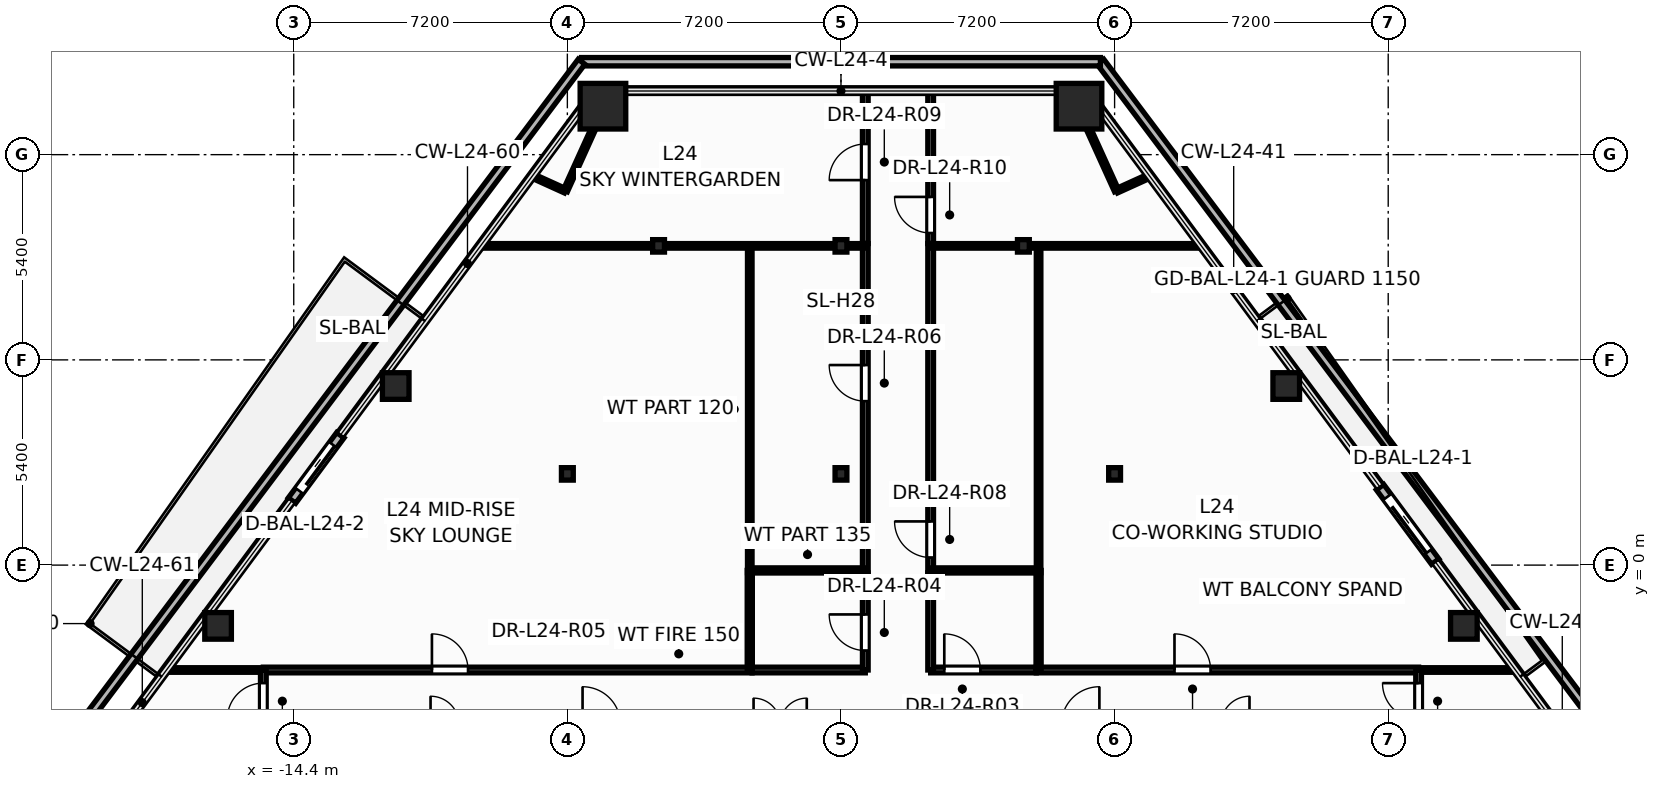
"""IFC4 building model, lengths in metres.
Left out: names, types, materials, properties, quantities, classifications, styles, units other than length and angle.
Written with IfcOpenShell. Run it as: python <this file> out.ifc"""

import sys

from ifc_helpers import new_model, si_unit, direction, frame, frame_2d, origin, origin_2d, place, context, subcontext, project, spatial, rectangle, hollow_rectangle, hollow_circle, i_section, extrude, element, fill, save


model = new_model("IFC4")
c1 = context("Model", 3, precision=1e-05, world=origin(), true_north=direction((0.0, 1.0)))
c2 = subcontext(c1, "Body", "Model", "MODEL_VIEW")
j1 = project(units=[si_unit("LENGTHUNIT", "METRE"), si_unit("PLANEANGLEUNIT", "RADIAN")], contexts=[c1])
p1 = place(None, origin())
s1 = spatial("IfcSite", under=j1, at=p1, CompositionType="ELEMENT")
p2 = place(p1, origin())
s2 = spatial("IfcBuilding", under=s1, at=p2, CompositionType="ELEMENT")
p3 = place(p2, frame((0.0, 0.0, 94.8)))
s3 = spatial("IfcBuildingStorey", under=s2, at=p3, CompositionType="ELEMENT", Elevation=94.8)
for number, where, z_axis, x_axis in (
    (1, (6.264, 12.075, 0.0), (0.0, 0.0, 1.0), (1.0, 0.0, 0.0)),
    (2, (-6.264, 12.075, 0.0), (0.0, 0.0, 1.0), (1.0, 0.0, 0.0)),
):
    element("IfcColumn", number, at=place(p3, frame(where, z_axis=z_axis, x_axis=x_axis)), inside=s3, PredefinedType="COLUMN", context=c2, shape_type="SweptSolid", body=[
        extrude(hollow_rectangle(XDim=1.2, YDim=1.2, WallThickness=0.055, at=origin_2d()), origin(), (0.0, 0.0, 1.0), 4.8),
    ])
for number, where, z_axis, x_axis in (
    (3, (16.391, -1.599, 0.0), (0.0, 0.0, 1.0), (1.0, 0.0, 0.0)),
    (4, (11.717, 4.712, 0.0), (0.0, 0.0, 1.0), (1.0, 0.0, 0.0)),
    (5, (-11.717, 4.712, 0.0), (0.0, 0.0, 1.0), (1.0, 0.0, 0.0)),
    (6, (-16.391, -1.599, 0.0), (0.0, 0.0, 1.0), (1.0, 0.0, 0.0)),
):
    element("IfcColumn", number, at=place(p3, frame(where, z_axis=z_axis, x_axis=x_axis)), inside=s3, PredefinedType="COLUMN", context=c2, shape_type="SweptSolid", body=[
        extrude(hollow_circle(Radius=0.35, WallThickness=0.03, at=origin_2d()), origin(), (0.0, 0.0, 1.0), 4.8),
    ])
for number, where, z_axis, x_axis in (
    (7, (-7.2, 2.4, 0.0), (0.0, 0.0, 1.0), (1.0, 0.0, 0.0)),
    (8, (0.0, 2.4, 0.0), (0.0, 0.0, 1.0), (1.0, 0.0, 0.0)),
    (9, (7.2, 2.4, 0.0), (0.0, 0.0, 1.0), (1.0, 0.0, 0.0)),
    (10, (-4.8, 8.4, 0.0), (0.0, 0.0, 1.0), (1.0, 0.0, 0.0)),
    (11, (0.0, 8.4, 0.0), (0.0, 0.0, 1.0), (1.0, 0.0, 0.0)),
    (12, (4.8, 8.4, 0.0), (0.0, 0.0, 1.0), (1.0, 0.0, 0.0)),
):
    element("IfcColumn", number, at=place(p3, frame(where, z_axis=z_axis, x_axis=x_axis)), inside=s3, PredefinedType="COLUMN", context=c2, shape_type="SweptSolid", body=[
        extrude(i_section(OverallWidth=0.311, OverallDepth=0.327, WebThickness=0.016, FlangeThickness=0.025, at=origin_2d()), origin(), (0.0, 0.0, 1.0), 4.8),
    ])
p4 = place(p3, frame((23.595, -9.052, -0.02), z_axis=(0.0, 0.0, 1.0), x_axis=(-0.601046808783, 0.799213822235, 0.0)))
e13 = element("IfcWall", 13, at=p4, inside=s3, PredefinedType="PARAPET", context=c2, shape_type="SweptSolid", body=[
    extrude(rectangle(XDim=27.898, YDim=0.22, at=frame_2d((13.949, 0.0))), origin(), (0.0, 0.0, 1.0), 1.17),
])
p5 = place(p3, frame((6.827, 13.245, -0.02), z_axis=(0.0, 0.0, 1.0), x_axis=(-1.0, 0.0, 0.0)))
e14 = element("IfcWall", 14, at=p5, inside=s3, PredefinedType="PARAPET", context=c2, shape_type="SweptSolid", body=[
    extrude(rectangle(XDim=13.653, YDim=0.22, at=frame_2d((6.827, 0.0))), origin(), (0.0, 0.0, 1.0), 1.17),
])
p6 = place(p3, frame((-6.827, 13.245, -0.02), z_axis=(0.0, 0.0, 1.0), x_axis=(-0.601046808783, -0.799213822235, 0.0)))
e15 = element("IfcWall", 15, at=p6, inside=s3, PredefinedType="PARAPET", context=c2, shape_type="SweptSolid", body=[
    extrude(rectangle(XDim=27.898, YDim=0.22, at=frame_2d((13.949, 0.0))), origin(), (0.0, 0.0, 1.0), 1.17),
])
p7 = place(p3, frame((15.637, 0.091, -0.015), z_axis=(0.0, 0.0, 1.0), x_axis=(-0.595170117465, 0.803599733248, 0.0)))
e16 = element("IfcWall", 16, at=p7, inside=s3, PredefinedType="STANDARD", context=c2, shape_type="SweptSolid", body=[
    extrude(rectangle(XDim=2.44, YDim=0.24, at=frame_2d((1.22, 0.0))), origin(), (0.0, 0.0, 1.0), 3.928),
])
p8 = place(p7, frame((0.32, 0.0, 0.015)))
e17 = element("IfcOpeningElement", 17, at=p8, cuts=e16, PredefinedType="OPENING", context=c2, shape_type="SweptSolid", body=[
    extrude(rectangle(XDim=1.806, YDim=2.204, at=frame_2d((0.9, 1.102))), frame((0.0, 0.13, 0.0), z_axis=(0.0, -1.0, 0.0), x_axis=(1.0, 0.0, 0.0)), (0.0, 0.0, 1.0), 0.26),
])
p9 = place(p3, frame((-13.173, 3.418, -0.015), z_axis=(0.0, 0.0, 1.0), x_axis=(-0.595170255066, -0.803599631337, 0.0)))
e18 = element("IfcWall", 18, at=p9, inside=s3, PredefinedType="STANDARD", context=c2, shape_type="SweptSolid", body=[
    extrude(rectangle(XDim=2.14, YDim=0.24, at=frame_2d((1.07, 0.0))), origin(), (0.0, 0.0, 1.0), 3.928),
])
p10 = place(p9, frame((0.32, 0.0, 0.015)))
e19 = element("IfcOpeningElement", 19, at=p10, cuts=e18, PredefinedType="OPENING", context=c2, shape_type="SweptSolid", body=[
    extrude(rectangle(XDim=1.506, YDim=2.204, at=frame_2d((0.75, 1.102))), frame((0.0, 0.13, 0.0), z_axis=(0.0, -1.0, 0.0), x_axis=(1.0, 0.0, 0.0)), (0.0, 0.0, 1.0), 0.26),
])
p11 = place(p3, frame((-15.2, -2.76, 0.0), z_axis=(0.0, 0.0, 1.0), x_axis=(1.0, 0.0, 0.0)))
e20 = element("IfcWall", 20, at=p11, inside=s3, PredefinedType="PARTITIONING", context=c2, shape_type="SweptSolid", body=[
    extrude(rectangle(XDim=12.86, YDim=0.15, at=frame_2d((6.43, 0.0))), origin(), (0.0, 0.0, 1.0), 3.525),
])
p12 = place(p11, frame((4.436, 0.0, 0.0)))
e21 = element("IfcOpeningElement", 21, at=p12, cuts=e20, PredefinedType="OPENING", context=c2, shape_type="SweptSolid", body=[
    extrude(rectangle(XDim=0.956, YDim=2.104, at=frame_2d((0.475, 1.052))), frame((0.0, 0.085, 0.0), z_axis=(0.0, -1.0, 0.0), x_axis=(1.0, 0.0, 0.0)), (0.0, 0.0, 1.0), 0.17),
])
p13 = place(p3, frame((5.14, -2.76, 0.0), z_axis=(0.0, 0.0, 1.0), x_axis=(1.0, 0.0, 0.0)))
e22 = element("IfcWall", 22, at=p13, inside=s3, PredefinedType="PARTITIONING", context=c2, shape_type="SweptSolid", body=[
    extrude(rectangle(XDim=10.06, YDim=0.15, at=frame_2d((5.03, 0.0))), origin(), (0.0, 0.0, 1.0), 3.525),
])
p14 = place(p13, frame((3.636, 0.0, 0.0)))
e23 = element("IfcOpeningElement", 23, at=p14, cuts=e22, PredefinedType="OPENING", context=c2, shape_type="SweptSolid", body=[
    extrude(rectangle(XDim=0.956, YDim=2.104, at=frame_2d((0.475, 1.052))), frame((0.0, 0.085, 0.0), z_axis=(0.0, -1.0, 0.0), x_axis=(1.0, 0.0, 0.0)), (0.0, 0.0, 1.0), 0.17),
])
p15 = place(p3, frame((0.64, -0.2, 0.0), z_axis=(0.0, 0.0, 1.0), x_axis=(0.0, 1.0, 0.0)))
e24 = element("IfcWall", 24, at=p15, inside=s3, PredefinedType="PARTITIONING", context=c2, shape_type="SweptSolid", body=[
    extrude(rectangle(XDim=8.66, YDim=0.15, at=frame_2d((4.33, 0.0))), origin(), (0.0, 0.0, 1.0), 3.525),
])
p16 = place(p15, frame((4.514, 0.0, 0.0)))
e25 = element("IfcOpeningElement", 25, at=p16, cuts=e24, PredefinedType="OPENING", context=c2, shape_type="SweptSolid", body=[
    extrude(rectangle(XDim=0.956, YDim=2.104, at=frame_2d((0.475, 1.052))), frame((0.0, 0.085, 0.0), z_axis=(0.0, -1.0, 0.0), x_axis=(1.0, 0.0, 0.0)), (0.0, 0.0, 1.0), 0.17),
])
p17 = place(p3, frame((2.36, -0.2, 0.0), z_axis=(0.0, 0.0, 1.0), x_axis=(0.0, 1.0, 0.0)))
e26 = element("IfcWall", 26, at=p17, inside=s3, PredefinedType="PARTITIONING", context=c2, shape_type="SweptSolid", body=[
    extrude(rectangle(XDim=8.66, YDim=0.15, at=frame_2d((4.33, 0.0))), origin(), (0.0, 0.0, 1.0), 3.525),
])
p18 = place(p17, frame((0.4, 0.0, 0.0)))
e27 = element("IfcOpeningElement", 27, at=p18, cuts=e26, PredefinedType="OPENING", context=c2, shape_type="SweptSolid", body=[
    extrude(rectangle(XDim=0.956, YDim=2.104, at=frame_2d((0.475, 1.052))), frame((0.0, 0.085, 0.0), z_axis=(0.0, -1.0, 0.0), x_axis=(1.0, 0.0, 0.0)), (0.0, 0.0, 1.0), 0.17),
])
for number, where, z_axis, x_axis in (
    (28, (-2.4, -0.2, 0.0), (0.0, 0.0, 1.0), (0.0, 1.0, 0.0)),
    (29, (5.2, -0.2, 0.0), (0.0, 0.0, 1.0), (0.0, 1.0, 0.0)),
):
    element("IfcWall", number, at=place(p3, frame(where, z_axis=z_axis, x_axis=x_axis)), inside=s3, PredefinedType="PARTITIONING", context=c2, shape_type="SweptSolid", body=[
        extrude(rectangle(XDim=8.6, YDim=0.12, at=frame_2d((4.3, 0.0))), origin(), (0.0, 0.0, 1.0), 3.525),
    ])
p19 = place(p3, frame((-9.483, 8.4, 0.0), z_axis=(0.0, 0.0, 1.0), x_axis=(1.0, 0.0, 0.0)))
e30 = element("IfcWall", 30, at=p19, inside=s3, PredefinedType="PARTITIONING", context=c2, shape_type="SweptSolid", body=[
    extrude(rectangle(XDim=10.123, YDim=0.12, at=frame_2d((5.062, 0.0))), origin(), (0.0, 0.0, 1.0), 3.525),
])
p20 = place(p3, frame((2.36, 8.4, 0.0), z_axis=(0.0, 0.0, 1.0), x_axis=(1.0, 0.0, 0.0)))
e31 = element("IfcWall", 31, at=p20, inside=s3, PredefinedType="PARTITIONING", context=c2, shape_type="SweptSolid", body=[
    extrude(rectangle(XDim=7.123, YDim=0.12, at=frame_2d((3.562, 0.0))), origin(), (0.0, 0.0, 1.0), 3.525),
])
p21 = place(p3, frame((0.64, 8.462, 0.0), z_axis=(0.0, 0.0, 1.0), x_axis=(0.0, 1.0, 0.0)))
e32 = element("IfcWall", 32, at=p21, inside=s3, PredefinedType="PARTITIONING", context=c2, shape_type="SweptSolid", body=[
    extrude(rectangle(XDim=4.013, YDim=0.15, at=frame_2d((2.006, 0.0))), origin(), (0.0, 0.0, 1.0), 3.525),
])
p22 = place(p21, frame((1.668, 0.0, 0.0)))
e33 = element("IfcOpeningElement", 33, at=p22, cuts=e32, PredefinedType="OPENING", context=c2, shape_type="SweptSolid", body=[
    extrude(rectangle(XDim=0.956, YDim=2.104, at=frame_2d((0.475, 1.052))), frame((0.0, 0.085, 0.0), z_axis=(0.0, -1.0, 0.0), x_axis=(1.0, 0.0, 0.0)), (0.0, 0.0, 1.0), 0.17),
])
p23 = place(p3, frame((2.36, 8.462, 0.0), z_axis=(0.0, 0.0, 1.0), x_axis=(0.0, 1.0, 0.0)))
e34 = element("IfcWall", 34, at=p23, inside=s3, PredefinedType="PARTITIONING", context=c2, shape_type="SweptSolid", body=[
    extrude(rectangle(XDim=4.013, YDim=0.15, at=frame_2d((2.006, 0.0))), origin(), (0.0, 0.0, 1.0), 3.525),
])
p24 = place(p23, frame((0.276, 0.0, 0.0)))
e35 = element("IfcOpeningElement", 35, at=p24, cuts=e34, PredefinedType="OPENING", context=c2, shape_type="SweptSolid", body=[
    extrude(rectangle(XDim=0.956, YDim=2.104, at=frame_2d((0.475, 1.052))), frame((0.0, 0.085, 0.0), z_axis=(0.0, -1.0, 0.0), x_axis=(1.0, 0.0, 0.0)), (0.0, 0.0, 1.0), 0.17),
])
p25 = place(p3, frame((-2.338, -2.76, 0.0), z_axis=(0.0, 0.0, 1.0), x_axis=(1.0, 0.0, 0.0)))
e36 = element("IfcWall", 36, at=p25, inside=s3, PredefinedType="PARTITIONING", context=c2, shape_type="SweptSolid", body=[
    extrude(rectangle(XDim=2.978, YDim=0.15, at=frame_2d((1.489, 0.0))), origin(), (0.0, 0.0, 1.0), 3.525),
])
p26 = place(p3, frame((-2.4, -0.14, 0.0), z_axis=(0.0, 0.0, 1.0), x_axis=(1.0, 0.0, 0.0)))
e37 = element("IfcWall", 37, at=p26, inside=s3, PredefinedType="PARTITIONING", context=c2, shape_type="SweptSolid", body=[
    extrude(rectangle(XDim=3.04, YDim=0.135, at=frame_2d((1.52, 0.0))), origin(), (0.0, 0.0, 1.0), 3.525),
])
p27 = place(p3, frame((2.36, -2.76, 0.0), z_axis=(0.0, 0.0, 1.0), x_axis=(1.0, 0.0, 0.0)))
e38 = element("IfcWall", 38, at=p27, inside=s3, PredefinedType="PARTITIONING", context=c2, shape_type="SweptSolid", body=[
    extrude(rectangle(XDim=2.778, YDim=0.15, at=frame_2d((1.389, 0.0))), origin(), (0.0, 0.0, 1.0), 4.119),
])
p28 = place(p27, frame((0.359, 0.0, 0.0)))
e39 = element("IfcOpeningElement", 39, at=p28, cuts=e38, PredefinedType="OPENING", context=c2, shape_type="SweptSolid", body=[
    extrude(rectangle(XDim=0.956, YDim=2.104, at=frame_2d((0.475, 1.052))), frame((0.0, 0.085, 0.0), z_axis=(0.0, -1.0, 0.0), x_axis=(1.0, 0.0, 0.0)), (0.0, 0.0, 1.0), 0.17),
])
p29 = place(p3, frame((2.36, -0.14, 0.0), z_axis=(0.0, 0.0, 1.0), x_axis=(1.0, 0.0, 0.0)))
e40 = element("IfcWall", 40, at=p29, inside=s3, PredefinedType="PARTITIONING", context=c2, shape_type="SweptSolid", body=[
    extrude(rectangle(XDim=2.84, YDim=0.135, at=frame_2d((1.42, 0.0))), origin(), (0.0, 0.0, 1.0), 4.119),
])
p30 = place(p3, frame((2.36, -2.76, 0.0), z_axis=(0.0, 0.0, 1.0), x_axis=(0.0, 1.0, 0.0)))
e41 = element("IfcWall", 41, at=p30, inside=s3, PredefinedType="PARTITIONING", context=c2, shape_type="SweptSolid", body=[
    extrude(rectangle(XDim=2.558, YDim=0.15, at=frame_2d((1.279, 0.0))), origin(), (0.0, 0.0, 1.0), 4.55),
])
p31 = place(p3, frame((0.64, -2.76, 0.0), z_axis=(0.0, 0.0, 1.0), x_axis=(0.0, 1.0, 0.0)))
e42 = element("IfcWall", 42, at=p31, inside=s3, PredefinedType="PARTITIONING", context=c2, shape_type="SweptSolid", body=[
    extrude(rectangle(XDim=2.558, YDim=0.15, at=frame_2d((1.279, 0.0))), origin(), (0.0, 0.0, 1.0), 4.55),
])
p32 = place(p31, frame((0.512, 0.0, 0.0)))
e43 = element("IfcOpeningElement", 43, at=p32, cuts=e42, PredefinedType="OPENING", context=c2, shape_type="SweptSolid", body=[
    extrude(rectangle(XDim=0.956, YDim=2.104, at=frame_2d((0.475, 1.052))), frame((0.0, 0.085, 0.0), z_axis=(0.0, -1.0, 0.0), x_axis=(1.0, 0.0, 0.0)), (0.0, 0.0, 1.0), 0.17),
])
for number, where, z_axis, x_axis in (
    (44, (5.2, -2.76, 0.0), (0.0, 0.0, 1.0), (0.0, 1.0, 0.0)),
    (45, (-2.4, -2.76, 0.0), (0.0, 0.0, 1.0), (0.0, 1.0, 0.0)),
):
    element("IfcWall", number, at=place(p3, frame(where, z_axis=z_axis, x_axis=x_axis)), inside=s3, PredefinedType="PARTITIONING", context=c2, shape_type="SweptSolid", body=[
        extrude(rectangle(XDim=2.62, YDim=0.135, at=frame_2d((1.31, 0.0))), origin(), (0.0, 0.0, 1.0), 4.55),
    ])
for number, where, z_axis, x_axis in (
    (46, (-17.749, -2.76, 0.0), (0.0, 0.0, 1.0), (1.0, 0.0, 0.0)),
    (47, (15.2, -2.76, 0.0), (0.0, 0.0, 1.0), (1.0, 0.0, 0.0)),
):
    element("IfcWall", number, at=place(p3, frame(where, z_axis=z_axis, x_axis=x_axis)), inside=s3, PredefinedType="PARTITIONING", context=c2, shape_type="SweptSolid", body=[
        extrude(rectangle(XDim=2.549, YDim=0.12, at=frame_2d((1.274, 0.0))), origin(), (0.0, 0.0, 1.0), 3.913),
    ])
for number, where, z_axis, x_axis in (
    (48, (-6.469, 11.577, 0.0), (0.0, 0.0, 1.0), (-0.413, -0.911, 0.0)),
    (49, (7.254, 9.847, 0.0), (0.0, 0.0, 1.0), (-0.413, 0.911, 0.0)),
):
    element("IfcWall", number, at=place(p3, frame(where, z_axis=z_axis, x_axis=x_axis)), inside=s3, PredefinedType="PARTITIONING", context=c2, shape_type="SweptSolid", body=[
        extrude(rectangle(XDim=1.899, YDim=0.12, at=frame_2d((0.949, 0.0))), origin(), (0.0, 0.0, 1.0), 4.55),
    ])
p33 = place(p3, frame((-15.2, -4.4, 0.0), z_axis=(0.0, 0.0, 1.0), x_axis=(0.0, 1.0, 0.0)))
e50 = element("IfcWall", 50, at=p33, inside=s3, PredefinedType="PARTITIONING", context=c2, shape_type="SweptSolid", body=[
    extrude(rectangle(XDim=1.64, YDim=0.15, at=frame_2d((0.82, 0.0))), origin(), (0.0, 0.0, 1.0), 4.55),
])
p34 = place(p33, frame((0.345, 0.0, 0.0)))
e51 = element("IfcOpeningElement", 51, at=p34, cuts=e50, PredefinedType="OPENING", context=c2, shape_type="SweptSolid", body=[
    extrude(rectangle(XDim=0.956, YDim=2.104, at=frame_2d((0.475, 1.052))), frame((0.0, 0.085, 0.0), z_axis=(0.0, -1.0, 0.0), x_axis=(1.0, 0.0, 0.0)), (0.0, 0.0, 1.0), 0.17),
])
p35 = place(p3, frame((15.2, -4.4, 0.0), z_axis=(0.0, 0.0, 1.0), x_axis=(0.0, 1.0, 0.0)))
e52 = element("IfcWall", 52, at=p35, inside=s3, PredefinedType="PARTITIONING", context=c2, shape_type="SweptSolid", body=[
    extrude(rectangle(XDim=1.64, YDim=0.15, at=frame_2d((0.82, 0.0))), origin(), (0.0, 0.0, 1.0), 4.55),
])
p36 = place(p35, frame((0.345, 0.0, 0.0)))
e53 = element("IfcOpeningElement", 53, at=p36, cuts=e52, PredefinedType="OPENING", context=c2, shape_type="SweptSolid", body=[
    extrude(rectangle(XDim=0.956, YDim=2.104, at=frame_2d((0.475, 1.052))), frame((0.0, 0.085, 0.0), z_axis=(0.0, -1.0, 0.0), x_axis=(1.0, 0.0, 0.0)), (0.0, 0.0, 1.0), 0.17),
])
for number, where, z_axis, x_axis in (
    (54, (-7.254, 9.847, 0.0), (0.0, 0.0, 1.0), (-0.911, 0.413, 0.0)),
    (55, (8.111, 10.236, 0.0), (0.0, 0.0, 1.0), (-0.911, -0.413, 0.0)),
):
    element("IfcWall", number, at=place(p3, frame(where, z_axis=z_axis, x_axis=x_axis)), inside=s3, PredefinedType="PARTITIONING", context=c2, shape_type="SweptSolid", body=[
        extrude(rectangle(XDim=0.941, YDim=0.12, at=frame_2d((0.471, 0.0))), origin(), (0.0, 0.0, 1.0), 3.913),
    ])
for number, where, z_axis, x_axis in (
    (56, (-6.706, 12.133, 0.0), (0.0, 0.0, 1.0), (0.392, -0.92, 0.0)),
    (57, (6.469, 11.577, 0.0), (0.0, 0.0, 1.0), (0.392, 0.92, 0.0)),
):
    element("IfcWall", number, at=place(p3, frame(where, z_axis=z_axis, x_axis=x_axis)), inside=s3, PredefinedType="PARTITIONING", context=c2, shape_type="SweptSolid", body=[
        extrude(rectangle(XDim=0.604, YDim=0.12, at=frame_2d((0.302, 0.0))), origin(), (0.0, 0.0, 1.0), 3.913),
    ])
p37 = place(p8, origin())
e58 = element("IfcDoor", 58, at=p37, inside=s3, OperationType="SLIDING_TO_LEFT", PredefinedType="DOOR", context=c2, shape_type="SweptSolid", body=[
    extrude(rectangle(XDim=1.8, YDim=2.2, at=frame_2d((0.9, 1.1))), frame((0.0, 0.025, 0.0), z_axis=(0.0, -1.0, 0.0), x_axis=(1.0, 0.0, 0.0)), (0.0, 0.0, 1.0), 0.05),
])
fill(e17, e58)
p38 = place(p10, origin())
e59 = element("IfcDoor", 59, at=p38, inside=s3, OperationType="SLIDING_TO_RIGHT", PredefinedType="DOOR", context=c2, shape_type="SweptSolid", body=[
    extrude(rectangle(XDim=1.5, YDim=2.2, at=frame_2d((0.75, 1.1))), frame((0.0, 0.025, 0.0), z_axis=(0.0, -1.0, 0.0), x_axis=(1.0, 0.0, 0.0)), (0.0, 0.0, 1.0), 0.05),
])
fill(e19, e59)
p39 = place(p34, origin())
e60 = element("IfcDoor", 60, at=p39, inside=s3, OperationType="SINGLE_SWING_LEFT", PredefinedType="DOOR", context=c2, shape_type="SweptSolid", body=[
    extrude(rectangle(XDim=0.95, YDim=2.1, at=frame_2d((0.475, 1.05))), frame((0.0, 0.025, 0.0), z_axis=(0.0, -1.0, 0.0), x_axis=(1.0, 0.0, 0.0)), (0.0, 0.0, 1.0), 0.05),
])
fill(e51, e60)
p40 = place(p36, origin())
e61 = element("IfcDoor", 61, at=p40, inside=s3, OperationType="SINGLE_SWING_RIGHT", PredefinedType="DOOR", context=c2, shape_type="SweptSolid", body=[
    extrude(rectangle(XDim=0.95, YDim=2.1, at=frame_2d((0.475, 1.05))), frame((0.0, 0.025, 0.0), z_axis=(0.0, -1.0, 0.0), x_axis=(1.0, 0.0, 0.0)), (0.0, 0.0, 1.0), 0.05),
])
fill(e53, e61)
p41 = place(p28, origin())
e62 = element("IfcDoor", 62, at=p41, inside=s3, OperationType="SINGLE_SWING_LEFT", PredefinedType="DOOR", context=c2, shape_type="SweptSolid", body=[
    extrude(rectangle(XDim=0.95, YDim=2.1, at=frame_2d((0.475, 1.05))), frame((0.0, 0.025, 0.0), z_axis=(0.0, -1.0, 0.0), x_axis=(1.0, 0.0, 0.0)), (0.0, 0.0, 1.0), 0.05),
])
fill(e39, e62)
p42 = place(p32, origin())
e63 = element("IfcDoor", 63, at=p42, inside=s3, OperationType="SINGLE_SWING_RIGHT", PredefinedType="DOOR", context=c2, shape_type="SweptSolid", body=[
    extrude(rectangle(XDim=0.95, YDim=2.1, at=frame_2d((0.475, 1.05))), frame((0.0, 0.025, 0.0), z_axis=(0.0, -1.0, 0.0), x_axis=(1.0, 0.0, 0.0)), (0.0, 0.0, 1.0), 0.05),
])
fill(e43, e63)
p43 = place(p12, origin())
e64 = element("IfcDoor", 64, at=p43, inside=s3, OperationType="SINGLE_SWING_LEFT", PredefinedType="DOOR", context=c2, shape_type="SweptSolid", body=[
    extrude(rectangle(XDim=0.95, YDim=2.1, at=frame_2d((0.475, 1.05))), frame((0.0, 0.025, 0.0), z_axis=(0.0, -1.0, 0.0), x_axis=(1.0, 0.0, 0.0)), (0.0, 0.0, 1.0), 0.05),
])
fill(e21, e64)
p44 = place(p16, origin())
e65 = element("IfcDoor", 65, at=p44, inside=s3, OperationType="SINGLE_SWING_RIGHT", PredefinedType="DOOR", context=c2, shape_type="SweptSolid", body=[
    extrude(rectangle(XDim=0.95, YDim=2.1, at=frame_2d((0.475, 1.05))), frame((0.0, 0.025, 0.0), z_axis=(0.0, -1.0, 0.0), x_axis=(1.0, 0.0, 0.0)), (0.0, 0.0, 1.0), 0.05),
])
fill(e25, e65)
p45 = place(p14, origin())
e66 = element("IfcDoor", 66, at=p45, inside=s3, OperationType="SINGLE_SWING_LEFT", PredefinedType="DOOR", context=c2, shape_type="SweptSolid", body=[
    extrude(rectangle(XDim=0.95, YDim=2.1, at=frame_2d((0.475, 1.05))), frame((0.0, 0.025, 0.0), z_axis=(0.0, -1.0, 0.0), x_axis=(1.0, 0.0, 0.0)), (0.0, 0.0, 1.0), 0.05),
])
fill(e23, e66)
p46 = place(p18, origin())
e67 = element("IfcDoor", 67, at=p46, inside=s3, OperationType="SINGLE_SWING_RIGHT", PredefinedType="DOOR", context=c2, shape_type="SweptSolid", body=[
    extrude(rectangle(XDim=0.95, YDim=2.1, at=frame_2d((0.475, 1.05))), frame((0.0, 0.025, 0.0), z_axis=(0.0, -1.0, 0.0), x_axis=(1.0, 0.0, 0.0)), (0.0, 0.0, 1.0), 0.05),
])
fill(e27, e67)
p47 = place(p22, origin())
e68 = element("IfcDoor", 68, at=p47, inside=s3, OperationType="SINGLE_SWING_LEFT", PredefinedType="DOOR", context=c2, shape_type="SweptSolid", body=[
    extrude(rectangle(XDim=0.95, YDim=2.1, at=frame_2d((0.475, 1.05))), frame((0.0, 0.025, 0.0), z_axis=(0.0, -1.0, 0.0), x_axis=(1.0, 0.0, 0.0)), (0.0, 0.0, 1.0), 0.05),
])
fill(e33, e68)
p48 = place(p24, origin())
e69 = element("IfcDoor", 69, at=p48, inside=s3, OperationType="SINGLE_SWING_RIGHT", PredefinedType="DOOR", context=c2, shape_type="SweptSolid", body=[
    extrude(rectangle(XDim=0.95, YDim=2.1, at=frame_2d((0.475, 1.05))), frame((0.0, 0.025, 0.0), z_axis=(0.0, -1.0, 0.0), x_axis=(1.0, 0.0, 0.0)), (0.0, 0.0, 1.0), 0.05),
])
fill(e35, e69)
save(model, sys.argv[1])
